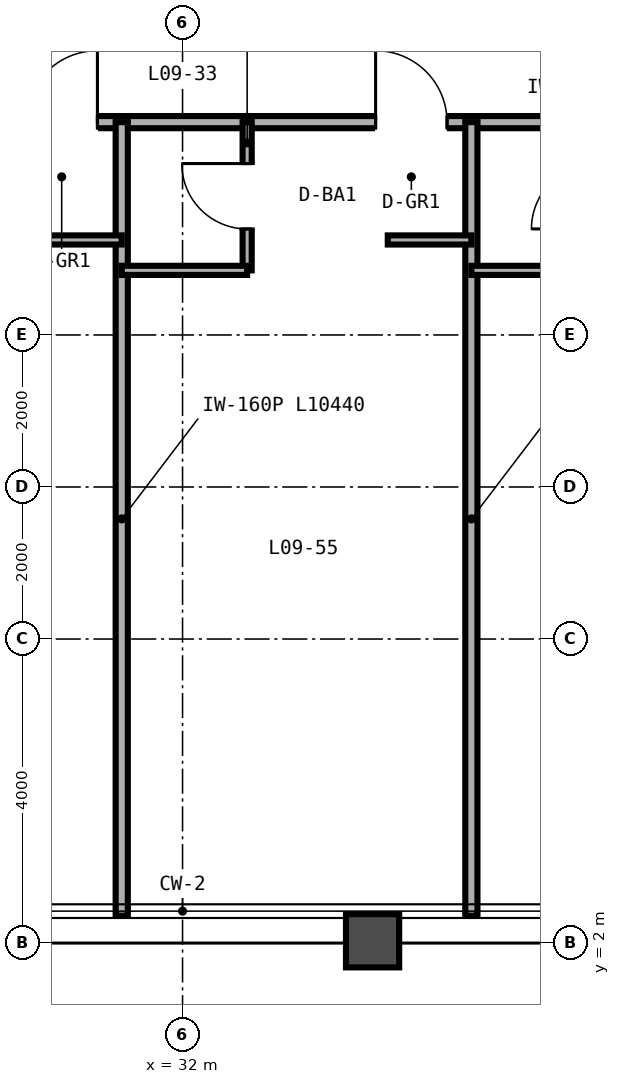
"""IFC4 building model, lengths in metres.
Left out: names, types, materials, properties, quantities, classifications, styles, units other than length and angle.
Written with IfcOpenShell. Run it as: python <this file> out.ifc"""

import sys

from ifc_helpers import new_model, si_unit, direction, frame, frame_2d, origin, place, context, subcontext, project, spatial, rectangle, extrude, source, transform, mapped, element, fill, save


model = new_model("IFC4")
c1 = context("Model", 3, precision=1e-05, world=origin(), true_north=direction((0.0, 1.0)))
c2 = subcontext(c1, "Body", "Model", "MODEL_VIEW")
j1 = project(units=[si_unit("LENGTHUNIT", "METRE"), si_unit("PLANEANGLEUNIT", "RADIAN")], contexts=[c1])
p1 = place(None, origin())
s1 = spatial("IfcSite", under=j1, at=p1, CompositionType="ELEMENT")
p2 = place(p1, origin())
s2 = spatial("IfcBuilding", under=s1, at=p2, CompositionType="ELEMENT")
p3 = place(p2, frame((0.0, 0.0, 42.0)))
s3 = spatial("IfcBuildingStorey", under=s2, at=p3, CompositionType="ELEMENT", Elevation=42.0)
p4 = place(p3, frame((14.0, 12.8, 0.0), z_axis=(0.0, 0.0, 1.0), x_axis=(1.0, 0.0, 0.0)))
e1 = element("IfcWall", 1, at=p4, inside=s3, PredefinedType="PARTITIONING", context=c2, shape_type="SweptSolid", body=[
    extrude(rectangle(XDim=36.0, YDim=0.16, at=frame_2d((18.0, 0.0))), origin(), (0.0, 0.0, 1.0), 2.571),
])
p5 = place(p4, frame((2.94, 0.0, 0.0)))
e2 = element("IfcOpeningElement", 2, at=p5, cuts=e1, PredefinedType="OPENING", context=c2, shape_type="SweptSolid", body=[
    extrude(rectangle(XDim=0.94, YDim=2.15, at=frame_2d((0.47, 1.075))), frame((0.0, 0.09, 0.0), z_axis=(0.0, -1.0, 0.0), x_axis=(1.0, 0.0, 0.0)), (0.0, 0.0, 1.0), 0.18),
])
p6 = place(p4, frame((7.14, 0.0, 0.0)))
e3 = element("IfcOpeningElement", 3, at=p6, cuts=e1, PredefinedType="OPENING", context=c2, shape_type="SweptSolid", body=[
    extrude(rectangle(XDim=0.94, YDim=2.15, at=frame_2d((0.47, 1.075))), frame((0.0, 0.09, 0.0), z_axis=(0.0, -1.0, 0.0), x_axis=(1.0, 0.0, 0.0)), (0.0, 0.0, 1.0), 0.18),
])
p7 = place(p4, frame((11.54, 0.0, 0.0)))
e4 = element("IfcOpeningElement", 4, at=p7, cuts=e1, PredefinedType="OPENING", context=c2, shape_type="SweptSolid", body=[
    extrude(rectangle(XDim=0.94, YDim=2.15, at=frame_2d((0.47, 1.075))), frame((0.0, 0.09, 0.0), z_axis=(0.0, -1.0, 0.0), x_axis=(1.0, 0.0, 0.0)), (0.0, 0.0, 1.0), 0.18),
])
p8 = place(p4, frame((15.94, 0.0, 0.0)))
e5 = element("IfcOpeningElement", 5, at=p8, cuts=e1, PredefinedType="OPENING", context=c2, shape_type="SweptSolid", body=[
    extrude(rectangle(XDim=0.94, YDim=2.15, at=frame_2d((0.47, 1.075))), frame((0.0, 0.09, 0.0), z_axis=(0.0, -1.0, 0.0), x_axis=(1.0, 0.0, 0.0)), (0.0, 0.0, 1.0), 0.18),
])
p9 = place(p4, frame((20.54, 0.0, 0.0)))
e6 = element("IfcOpeningElement", 6, at=p9, cuts=e1, PredefinedType="OPENING", context=c2, shape_type="SweptSolid", body=[
    extrude(rectangle(XDim=0.94, YDim=2.15, at=frame_2d((0.47, 1.075))), frame((0.0, 0.09, 0.0), z_axis=(0.0, -1.0, 0.0), x_axis=(1.0, 0.0, 0.0)), (0.0, 0.0, 1.0), 0.18),
])
p10 = place(p4, frame((24.84, 0.0, 0.0)))
e7 = element("IfcOpeningElement", 7, at=p10, cuts=e1, PredefinedType="OPENING", context=c2, shape_type="SweptSolid", body=[
    extrude(rectangle(XDim=0.94, YDim=2.15, at=frame_2d((0.47, 1.075))), frame((0.0, 0.09, 0.0), z_axis=(0.0, -1.0, 0.0), x_axis=(1.0, 0.0, 0.0)), (0.0, 0.0, 1.0), 0.18),
])
p11 = place(p4, frame((29.94, 0.0, 0.0)))
e8 = element("IfcOpeningElement", 8, at=p11, cuts=e1, PredefinedType="OPENING", context=c2, shape_type="SweptSolid", body=[
    extrude(rectangle(XDim=0.94, YDim=2.15, at=frame_2d((0.47, 1.075))), frame((0.0, 0.09, 0.0), z_axis=(0.0, -1.0, 0.0), x_axis=(1.0, 0.0, 0.0)), (0.0, 0.0, 1.0), 0.18),
])
p12 = place(p4, frame((34.74, 0.0, 0.0)))
e9 = element("IfcOpeningElement", 9, at=p12, cuts=e1, PredefinedType="OPENING", context=c2, shape_type="SweptSolid", body=[
    extrude(rectangle(XDim=0.94, YDim=2.15, at=frame_2d((0.47, 1.075))), frame((0.0, 0.09, 0.0), z_axis=(0.0, -1.0, 0.0), x_axis=(1.0, 0.0, 0.0)), (0.0, 0.0, 1.0), 0.18),
])
p13 = place(p3, frame((31.2, 2.36, 0.0), z_axis=(0.0, 0.0, 1.0), x_axis=(0.0, 1.0, 0.0)))
e10 = element("IfcWall", 10, at=p13, inside=s3, PredefinedType="PARTITIONING", context=c2, shape_type="SweptSolid", body=[
    extrude(rectangle(XDim=10.44, YDim=0.16, at=frame_2d((5.22, 0.0))), origin(), (0.0, 0.0, 1.0), 2.423),
])
p14 = place(p3, frame((30.1, 11.25, 0.0), z_axis=(0.0, 0.0, 1.0), x_axis=(1.0, 0.0, 0.0)))
e11 = element("IfcWall", 11, at=p14, inside=s3, PredefinedType="PARTITIONING", context=c2, shape_type="SweptSolid", body=[
    extrude(rectangle(XDim=1.1, YDim=0.12, at=frame_2d((0.55, 0.0))), origin(), (0.0, 0.0, 1.0), 3.35),
])
p15 = place(p3, frame((35.8, 2.36, 0.0), z_axis=(0.0, 0.0, 1.0), x_axis=(0.0, 1.0, 0.0)))
e12 = element("IfcWall", 12, at=p15, inside=s3, PredefinedType="PARTITIONING", context=c2, shape_type="SweptSolid", body=[
    extrude(rectangle(XDim=10.44, YDim=0.16, at=frame_2d((5.22, 0.0))), origin(), (0.0, 0.0, 1.0), 2.423),
])
p16 = place(p3, frame((32.85, 10.85, 0.0), z_axis=(0.0, 0.0, 1.0), x_axis=(0.0, 1.0, 0.0)))
e13 = element("IfcWall", 13, at=p16, inside=s3, PredefinedType="PARTITIONING", context=c2, shape_type="SweptSolid", body=[
    extrude(rectangle(XDim=1.95, YDim=0.12, at=frame_2d((0.975, 0.0))), origin(), (0.0, 0.0, 1.0), 3.35),
])
p17 = place(p16, frame((0.545, 0.0, 0.0)))
e14 = element("IfcOpeningElement", 14, at=p17, cuts=e13, PredefinedType="OPENING", context=c2, shape_type="SweptSolid", body=[
    extrude(rectangle(XDim=0.86, YDim=2.1, at=frame_2d((0.43, 1.05))), frame((0.0, 0.07, 0.0), z_axis=(0.0, -1.0, 0.0), x_axis=(1.0, 0.0, 0.0)), (0.0, 0.0, 1.0), 0.14),
])
p18 = place(p3, frame((31.2, 10.85, 0.0), z_axis=(0.0, 0.0, 1.0), x_axis=(1.0, 0.0, 0.0)))
e15 = element("IfcWall", 15, at=p18, inside=s3, PredefinedType="PARTITIONING", context=c2, shape_type="SweptSolid", body=[
    extrude(rectangle(XDim=1.65, YDim=0.12, at=frame_2d((0.825, 0.0))), origin(), (0.0, 0.0, 1.0), 3.35),
])
p19 = place(p3, frame((34.7, 11.25, 0.0), z_axis=(0.0, 0.0, 1.0), x_axis=(1.0, 0.0, 0.0)))
e16 = element("IfcWall", 16, at=p19, inside=s3, PredefinedType="PARTITIONING", context=c2, shape_type="SweptSolid", body=[
    extrude(rectangle(XDim=1.1, YDim=0.12, at=frame_2d((0.55, 0.0))), origin(), (0.0, 0.0, 1.0), 3.35),
])
p20 = place(p3, frame((35.8, 10.85, 0.0), z_axis=(0.0, 0.0, 1.0), x_axis=(1.0, 0.0, 0.0)))
e17 = element("IfcWall", 17, at=p20, inside=s3, PredefinedType="PARTITIONING", context=c2, shape_type="SweptSolid", body=[
    extrude(rectangle(XDim=1.65, YDim=0.12, at=frame_2d((0.825, 0.0))), origin(), (0.0, 0.0, 1.0), 3.35),
])
m1 = source(origin(), c2, "Body", "SweptSolid", [
    extrude(rectangle(XDim=0.86, YDim=2.1, at=frame_2d((0.43, 1.05))), frame((0.0, 0.025, 0.0), z_axis=(0.0, -1.0, 0.0), x_axis=(1.0, 0.0, 0.0)), (0.0, 0.0, 1.0), 0.05),
])
p21 = place(p17, origin())
e18 = element("IfcDoor", 18, at=p21, inside=s3, OperationType="SINGLE_SWING_RIGHT", PredefinedType="DOOR", context=c2, shape_type="MappedRepresentation", body=[
    mapped(m1, transform((0.0, 0.0, 0.0), scale=1.0)),
])
fill(e14, e18)
m2 = source(origin(), c2, "Body", "SweptSolid", [
    extrude(rectangle(XDim=0.94, YDim=2.15, at=frame_2d((0.47, 1.075))), frame((0.0, 0.025, 0.0), z_axis=(0.0, -1.0, 0.0), x_axis=(1.0, 0.0, 0.0)), (0.0, 0.0, 1.0), 0.05),
])
p22 = place(p8, origin())
e19 = element("IfcDoor", 19, at=p22, inside=s3, OperationType="SINGLE_SWING_RIGHT", PredefinedType="DOOR", context=c2, shape_type="MappedRepresentation", body=[
    mapped(m2, transform((0.0, 0.0, 0.0), scale=1.0)),
])
fill(e5, e19)
p23 = place(p9, origin())
e20 = element("IfcDoor", 20, at=p23, inside=s3, OperationType="SINGLE_SWING_LEFT", PredefinedType="DOOR", context=c2, shape_type="MappedRepresentation", body=[
    mapped(m2, transform((0.0, 0.0, 0.0), scale=1.0)),
])
fill(e6, e20)
save(model, sys.argv[1])
